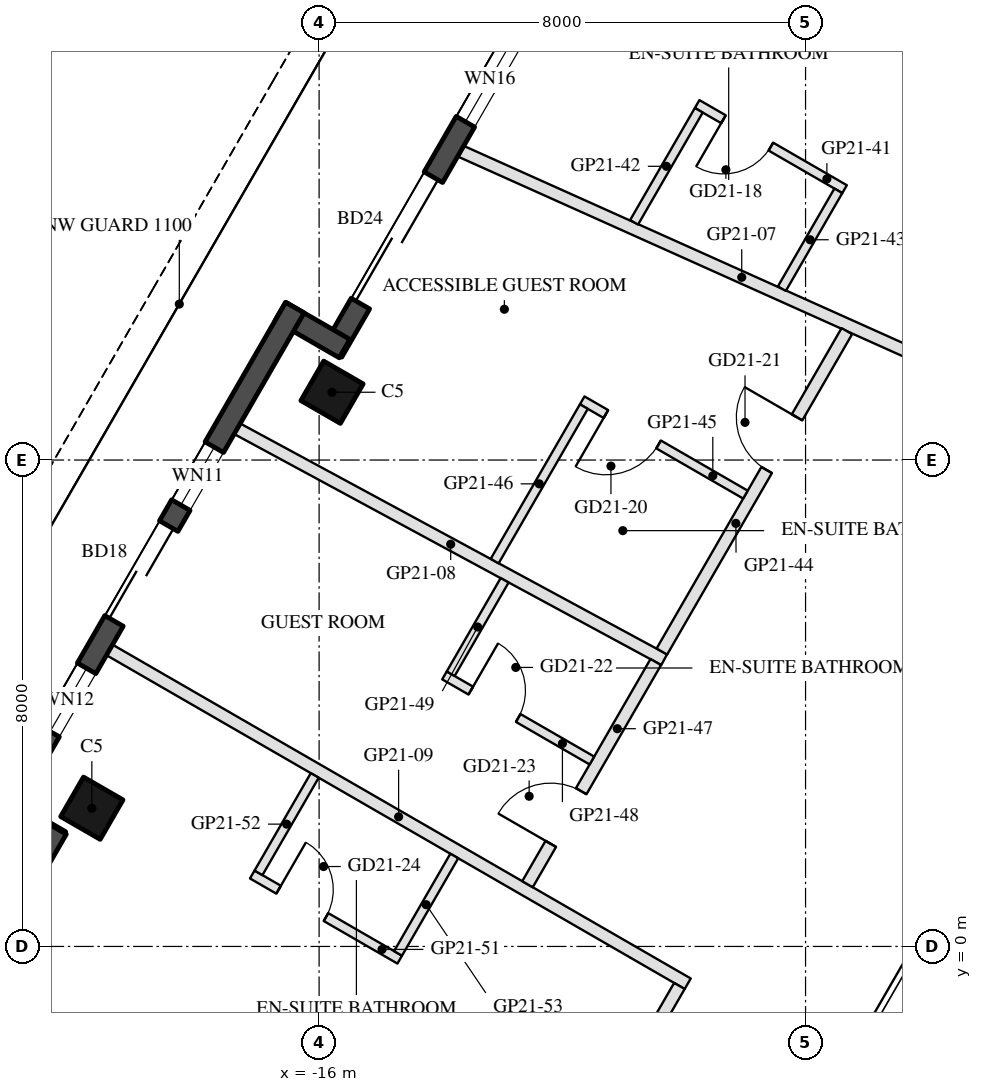
"""IFC4 building model, lengths in metres.
Left out: names, types, materials, properties, quantities, classifications, styles, units other than length and angle.
Written with IfcOpenShell. Run it as: python <this file> out.ifc"""

import sys

from ifc_helpers import new_model, si_unit, direction, frame, frame_2d, origin, origin_2d, place, context, subcontext, project, spatial, rectangle, hollow_rectangle, extrude, element, fill, save


model = new_model("IFC4")
c1 = context("Model", 3, precision=1e-05, world=origin(), true_north=direction((0.0, 1.0)))
c2 = subcontext(c1, "Body", "Model", "MODEL_VIEW")
j1 = project(units=[si_unit("LENGTHUNIT", "METRE"), si_unit("PLANEANGLEUNIT", "RADIAN")], contexts=[c1])
p1 = place(None, origin())
s1 = spatial("IfcSite", under=j1, at=p1, CompositionType="ELEMENT")
p2 = place(p1, origin())
s2 = spatial("IfcBuilding", under=s1, at=p2, CompositionType="ELEMENT")
p3 = place(p2, frame((0.0, 0.0, 220.6)))
s3 = spatial("IfcBuildingStorey", under=s2, at=p3, CompositionType="ELEMENT", Elevation=220.6)
for number, where, z_axis, x_axis in (
    (1, (-15.788, 9.115, 0.0), (0.0, 0.0, 1.0), (0.5, 0.866, 0.0)),
    (2, (-19.738, 2.273, 0.0), (0.0, 0.0, 1.0), (0.5, 0.866, 0.0)),
):
    element("IfcColumn", number, at=place(p3, frame(where, z_axis=z_axis, x_axis=x_axis)), inside=s3, PredefinedType="COLUMN", context=c2, shape_type="SweptSolid", body=[
        extrude(hollow_rectangle(XDim=0.75, YDim=0.75, WallThickness=0.035, at=origin_2d()), origin(), (0.0, 0.0, 1.0), 3.7),
    ])
p4 = place(p3, frame((-12.409, 15.617, 0.0), z_axis=(0.0, 0.0, 1.0), x_axis=(-0.500003597184, -0.866023326939, 0.0)))
e3 = element("IfcWall", 3, at=p4, inside=s3, PredefinedType="SOLIDWALL", context=c2, shape_type="SweptSolid", body=[
    extrude(rectangle(XDim=6.74, YDim=0.35, at=frame_2d((3.37, 0.0))), origin(), (0.0, 0.0, 1.0), 3.55),
])
p5 = place(p4, frame((0.77, 0.0, 0.3)))
e4 = element("IfcOpeningElement", 4, at=p5, cuts=e3, PredefinedType="OPENING", context=c2, shape_type="SweptSolid", body=[
    extrude(rectangle(XDim=1.6, YDim=2.65, at=frame_2d((0.8, 1.325))), frame((0.0, 0.185, 0.0), z_axis=(0.0, -1.0, 0.0), x_axis=(1.0, 0.0, 0.0)), (0.0, 0.0, 1.0), 0.37),
])
p6 = place(p4, frame((3.424, 0.0, 0.0)))
e5 = element("IfcOpeningElement", 5, at=p6, cuts=e3, PredefinedType="OPENING", context=c2, shape_type="SweptSolid", body=[
    extrude(rectangle(XDim=2.4, YDim=2.4, at=frame_2d((1.2, 1.2))), frame((0.0, 0.185, 0.0), z_axis=(0.0, -1.0, 0.0), x_axis=(1.0, 0.0, 0.0)), (0.0, 0.0, 1.0), 0.37),
])
p7 = place(p3, frame((-15.581, 9.833, 0.0), z_axis=(0.0, 0.0, 1.0), x_axis=(-0.866055662726, 0.499947586314, 0.0)))
e6 = element("IfcWall", 6, at=p7, inside=s3, PredefinedType="SOLIDWALL", context=c2, shape_type="SweptSolid", body=[
    extrude(rectangle(XDim=1.22, YDim=0.35, at=frame_2d((0.61, 0.0))), origin(), (0.0, 0.0, 1.0), 3.55),
])
p8 = place(p3, frame((-16.398, 10.507, 0.0), z_axis=(0.0, 0.0, 1.0), x_axis=(-0.499999142773, -0.866025898704, 0.0)))
e7 = element("IfcWall", 7, at=p8, inside=s3, PredefinedType="SOLIDWALL", context=c2, shape_type="SweptSolid", body=[
    extrude(rectangle(XDim=9.7, YDim=0.35, at=frame_2d((4.85, 0.0))), origin(), (0.0, 0.0, 1.0), 3.55),
])
p9 = place(p8, frame((4.149, 0.0, 0.0)))
e8 = element("IfcOpeningElement", 8, at=p9, cuts=e7, PredefinedType="OPENING", context=c2, shape_type="SweptSolid", body=[
    extrude(rectangle(XDim=1.8, YDim=2.4, at=frame_2d((0.9, 1.2))), frame((0.0, 0.185, 0.0), z_axis=(0.0, -1.0, 0.0), x_axis=(1.0, 0.0, 0.0)), (0.0, 0.0, 1.0), 0.37),
])
p10 = place(p8, frame((2.65, 0.0, 0.3)))
e9 = element("IfcOpeningElement", 9, at=p10, cuts=e7, PredefinedType="OPENING", context=c2, shape_type="SweptSolid", body=[
    extrude(rectangle(XDim=1.1, YDim=2.65, at=frame_2d((0.55, 1.325))), frame((0.0, 0.185, 0.0), z_axis=(0.0, -1.0, 0.0), x_axis=(1.0, 0.0, 0.0)), (0.0, 0.0, 1.0), 0.37),
])
p11 = place(p8, frame((6.85, 0.0, 0.3)))
e10 = element("IfcOpeningElement", 10, at=p11, cuts=e7, PredefinedType="OPENING", context=c2, shape_type="SweptSolid", body=[
    extrude(rectangle(XDim=1.2, YDim=2.65, at=frame_2d((0.6, 1.325))), frame((0.0, 0.185, 0.0), z_axis=(0.0, -1.0, 0.0), x_axis=(1.0, 0.0, 0.0)), (0.0, 0.0, 1.0), 0.37),
])
p12 = place(p3, frame((-21.312, 2.346, 0.0), z_axis=(0.0, 0.0, 1.0), x_axis=(0.866005645448, -0.500034220881, 0.0)))
e11 = element("IfcWall", 11, at=p12, inside=s3, PredefinedType="SOLIDWALL", context=c2, shape_type="SweptSolid", body=[
    extrude(rectangle(XDim=1.22, YDim=0.35, at=frame_2d((0.61, 0.0))), origin(), (0.0, 0.0, 1.0), 3.55),
])
p13 = place(p3, frame((-20.309, 1.934, 0.0), z_axis=(0.0, 0.0, 1.0), x_axis=(-0.499992114976, -0.866029956157, 0.0)))
e12 = element("IfcWall", 12, at=p13, inside=s3, PredefinedType="SOLIDWALL", context=c2, shape_type="SweptSolid", body=[
    extrude(rectangle(XDim=6.74, YDim=0.35, at=frame_2d((3.37, 0.0))), origin(), (0.0, 0.0, 1.0), 3.55),
])
p14 = place(p13, frame((0.77, 0.0, 0.0)))
e13 = element("IfcOpeningElement", 13, at=p14, cuts=e12, PredefinedType="OPENING", context=c2, shape_type="SweptSolid", body=[
    extrude(rectangle(XDim=2.4, YDim=2.4, at=frame_2d((1.2, 1.2))), frame((0.0, 0.185, 0.0), z_axis=(0.0, -1.0, 0.0), x_axis=(1.0, 0.0, 0.0)), (0.0, 0.0, 1.0), 0.37),
])
p15 = place(p13, frame((3.47, 0.0, 0.3)))
e14 = element("IfcOpeningElement", 14, at=p15, cuts=e12, PredefinedType="OPENING", context=c2, shape_type="SweptSolid", body=[
    extrude(rectangle(XDim=2.9, YDim=2.65, at=frame_2d((1.45, 1.325))), frame((0.0, 0.185, 0.0), z_axis=(0.0, -1.0, 0.0), x_axis=(1.0, 0.0, 0.0)), (0.0, 0.0, 1.0), 0.37),
])
p16 = place(p3, frame((-13.672, 13.08, 0.0), z_axis=(0.0, 0.0, 1.0), x_axis=(0.912311972773, -0.409495866077, 0.0)))
e15 = element("IfcWall", 15, at=p16, inside=s3, PredefinedType="PARTITIONING", context=c2, shape_type="SweptSolid", body=[
    extrude(rectangle(XDim=10.132, YDim=0.2, at=frame_2d((5.066, 0.0))), origin(), (0.0, 0.0, 1.0), 3.06),
])
p17 = place(p3, frame((-17.347, 8.514, 0.0), z_axis=(0.0, 0.0, 1.0), x_axis=(0.879604495132, -0.475705720109, 0.0)))
e16 = element("IfcWall", 16, at=p17, inside=s3, PredefinedType="PARTITIONING", context=c2, shape_type="SweptSolid", body=[
    extrude(rectangle(XDim=7.983, YDim=0.2, at=frame_2d((3.992, 0.0))), origin(), (0.0, 0.0, 1.0), 3.06),
])
p18 = place(p3, frame((-19.447, 4.877, 0.0), z_axis=(0.0, 0.0, 1.0), x_axis=(0.866027479907, -0.499996404033, 0.0)))
e17 = element("IfcWall", 17, at=p18, inside=s3, PredefinedType="PARTITIONING", context=c2, shape_type="SweptSolid", body=[
    extrude(rectangle(XDim=10.98, YDim=0.2, at=frame_2d((5.49, 0.0))), origin(), (0.0, 0.0, 1.0), 3.06),
])
p19 = place(p3, frame((-7.358, 12.455, 0.0), z_axis=(0.0, 0.0, 1.0), x_axis=(-0.866034573852, 0.49998411664, 0.0)))
e18 = element("IfcWall", 18, at=p19, inside=s3, PredefinedType="PARTITIONING", context=c2, shape_type="SweptSolid", body=[
    extrude(rectangle(XDim=2.8, YDim=0.15, at=frame_2d((1.4, 0.0))), origin(), (0.0, 0.0, 1.0), 3.55),
])
p20 = place(p19, frame((1.4, 0.0, 0.0)))
e19 = element("IfcOpeningElement", 19, at=p20, cuts=e18, PredefinedType="OPENING", context=c2, shape_type="SweptSolid", body=[
    extrude(rectangle(XDim=0.9, YDim=2.1, at=frame_2d((0.45, 1.05))), frame((0.0, 0.085, 0.0), z_axis=(0.0, -1.0, 0.0), x_axis=(1.0, 0.0, 0.0)), (0.0, 0.0, 1.0), 0.17),
])
p21 = place(p3, frame((-9.756, 13.752, 0.0), z_axis=(0.0, 0.0, 1.0), x_axis=(-0.50001378257, -0.866017446268, 0.0)))
e20 = element("IfcWall", 20, at=p21, inside=s3, PredefinedType="PARTITIONING", context=c2, shape_type="SweptSolid", body=[
    extrude(rectangle(XDim=2.128, YDim=0.15, at=frame_2d((1.064, 0.0))), origin(), (0.0, 0.0, 1.0), 3.55),
])
p22 = place(p3, frame((-7.461, 12.427, 0.0), z_axis=(0.0, 0.0, 1.0), x_axis=(-0.500025795397, -0.866010510293, 0.0)))
e21 = element("IfcWall", 21, at=p22, inside=s3, PredefinedType="PARTITIONING", context=c2, shape_type="SweptSolid", body=[
    extrude(rectangle(XDim=1.858, YDim=0.15, at=frame_2d((0.929, 0.0))), origin(), (0.0, 0.0, 1.0), 3.55),
])
p23 = place(p3, frame((-10.363, 4.851, 0.0), z_axis=(0.0, 0.0, 1.0), x_axis=(0.50000147882, 0.866024549986, 0.0)))
e22 = element("IfcWall", 22, at=p23, inside=s3, PredefinedType="PARTITIONING", context=c2, shape_type="SweptSolid", body=[
    extrude(rectangle(XDim=6.084, YDim=0.2, at=frame_2d((3.042, 0.0))), origin(), (0.0, 0.0, 1.0), 2.95),
])
p24 = place(p23, frame((3.447, 0.0, 0.0)))
e23 = element("IfcOpeningElement", 23, at=p24, cuts=e22, PredefinedType="OPENING", context=c2, shape_type="SweptSolid", body=[
    extrude(rectangle(XDim=1.0, YDim=2.1, at=frame_2d((0.5, 1.05))), frame((0.0, 0.11, 0.0), z_axis=(0.0, -1.0, 0.0), x_axis=(1.0, 0.0, 0.0)), (0.0, 0.0, 1.0), 0.22),
])
p25 = place(p3, frame((-8.989, 7.431, 0.0), z_axis=(0.0, 0.0, 1.0), x_axis=(-0.86600983753, 0.500026960575, 0.0)))
e24 = element("IfcWall", 24, at=p25, inside=s3, PredefinedType="PARTITIONING", context=c2, shape_type="SweptSolid", body=[
    extrude(rectangle(XDim=3.1, YDim=0.15, at=frame_2d((1.55, 0.0))), origin(), (0.0, 0.0, 1.0), 3.55),
])
p26 = place(p25, frame((1.65, 0.0, 0.0)))
e25 = element("IfcOpeningElement", 25, at=p26, cuts=e24, PredefinedType="OPENING", context=c2, shape_type="SweptSolid", body=[
    extrude(rectangle(XDim=1.0, YDim=2.1, at=frame_2d((0.5, 1.05))), frame((0.0, 0.085, 0.0), z_axis=(0.0, -1.0, 0.0), x_axis=(1.0, 0.0, 0.0)), (0.0, 0.0, 1.0), 0.17),
])
p27 = place(p3, frame((-11.646, 8.879, 0.0), z_axis=(0.0, 0.0, 1.0), x_axis=(-0.499996155683, -0.86602762329, 0.0)))
e26 = element("IfcWall", 26, at=p27, inside=s3, PredefinedType="PARTITIONING", context=c2, shape_type="SweptSolid", body=[
    extrude(rectangle(XDim=2.934, YDim=0.15, at=frame_2d((1.467, 0.0))), origin(), (0.0, 0.0, 1.0), 2.95),
])
p28 = place(p3, frame((-12.573, 1.023, 0.0), z_axis=(0.0, 0.0, 1.0), x_axis=(0.499991256393, 0.86603045185, 0.0)))
e27 = element("IfcWall", 27, at=p28, inside=s3, PredefinedType="PARTITIONING", context=c2, shape_type="SweptSolid", body=[
    extrude(rectangle(XDim=4.219, YDim=0.2, at=frame_2d((2.11, 0.0))), origin(), (0.0, 0.0, 1.0), 2.95),
])
p29 = place(p28, frame((0.766, 0.0, 0.0)))
e28 = element("IfcOpeningElement", 28, at=p29, cuts=e27, PredefinedType="OPENING", context=c2, shape_type="SweptSolid", body=[
    extrude(rectangle(XDim=1.0, YDim=2.1, at=frame_2d((0.5, 1.05))), frame((0.0, 0.11, 0.0), z_axis=(0.0, -1.0, 0.0), x_axis=(1.0, 0.0, 0.0)), (0.0, 0.0, 1.0), 0.22),
])
p30 = place(p3, frame((-13.938, 4.458, 0.0), z_axis=(0.0, 0.0, 1.0), x_axis=(0.865996816683, -0.500049511043, 0.0)))
e29 = element("IfcWall", 29, at=p30, inside=s3, PredefinedType="PARTITIONING", context=c2, shape_type="SweptSolid", body=[
    extrude(rectangle(XDim=2.8, YDim=0.15, at=frame_2d((1.4, 0.0))), origin(), (0.0, 0.0, 1.0), 3.55),
])
p31 = place(p30, frame((0.5, 0.0, 0.0)))
e30 = element("IfcOpeningElement", 30, at=p31, cuts=e29, PredefinedType="OPENING", context=c2, shape_type="SweptSolid", body=[
    extrude(rectangle(XDim=0.9, YDim=2.1, at=frame_2d((0.45, 1.05))), frame((0.0, 0.085, 0.0), z_axis=(0.0, -1.0, 0.0), x_axis=(1.0, 0.0, 0.0)), (0.0, 0.0, 1.0), 0.17),
])
p32 = place(p3, frame((-12.949, 6.022, 0.0), z_axis=(0.0, 0.0, 1.0), x_axis=(-0.499913039621, -0.866075604562, 0.0)))
e31 = element("IfcWall", 31, at=p32, inside=s3, PredefinedType="PARTITIONING", context=c2, shape_type="SweptSolid", body=[
    extrude(rectangle(XDim=1.774, YDim=0.15, at=frame_2d((0.887, 0.0))), origin(), (0.0, 0.0, 1.0), 3.55),
])
p33 = place(p3, frame((-12.269, -4.45, 0.0), z_axis=(0.0, 0.0, 1.0), x_axis=(0.499998569178, 0.866026229868, 0.0)))
e32 = element("IfcWall", 32, at=p33, inside=s3, PredefinedType="PARTITIONING", context=c2, shape_type="SweptSolid", body=[
    extrude(rectangle(XDim=4.388, YDim=0.2, at=frame_2d((2.194, 0.0))), origin(), (0.0, 0.0, 1.0), 2.95),
])
p34 = place(p33, frame((1.694, 0.0, 0.0)))
e33 = element("IfcOpeningElement", 33, at=p34, cuts=e32, PredefinedType="OPENING", context=c2, shape_type="SweptSolid", body=[
    extrude(rectangle(XDim=1.0, YDim=2.1, at=frame_2d((0.5, 1.05))), frame((0.0, 0.11, 0.0), z_axis=(0.0, -1.0, 0.0), x_axis=(1.0, 0.0, 0.0)), (0.0, 0.0, 1.0), 0.22),
])
p35 = place(p3, frame((-17.099, 1.183, 0.0), z_axis=(0.0, 0.0, 1.0), x_axis=(0.866056369097, -0.49994636267, 0.0)))
e34 = element("IfcWall", 34, at=p35, inside=s3, PredefinedType="PARTITIONING", context=c2, shape_type="SweptSolid", body=[
    extrude(rectangle(XDim=2.8, YDim=0.15, at=frame_2d((1.4, 0.0))), origin(), (0.0, 0.0, 1.0), 3.55),
])
p36 = place(p35, frame((0.5, 0.0, 0.0)))
e35 = element("IfcOpeningElement", 35, at=p36, cuts=e34, PredefinedType="OPENING", context=c2, shape_type="SweptSolid", body=[
    extrude(rectangle(XDim=0.9, YDim=2.1, at=frame_2d((0.45, 1.05))), frame((0.0, 0.085, 0.0), z_axis=(0.0, -1.0, 0.0), x_axis=(1.0, 0.0, 0.0)), (0.0, 0.0, 1.0), 0.17),
])
p37 = place(p3, frame((-16.072, 2.813, 0.0), z_axis=(0.0, 0.0, 1.0), x_axis=(-0.500042316284, -0.866000971088, 0.0)))
e36 = element("IfcWall", 36, at=p37, inside=s3, PredefinedType="PARTITIONING", context=c2, shape_type="SweptSolid", body=[
    extrude(rectangle(XDim=1.85, YDim=0.15, at=frame_2d((0.925, 0.0))), origin(), (0.0, 0.0, 1.0), 3.55),
])
p38 = place(p3, frame((-13.777, 1.488, 0.0), z_axis=(0.0, 0.0, 1.0), x_axis=(-0.499985172903, -0.866033964044, 0.0)))
e37 = element("IfcWall", 37, at=p38, inside=s3, PredefinedType="PARTITIONING", context=c2, shape_type="SweptSolid", body=[
    extrude(rectangle(XDim=1.85, YDim=0.15, at=frame_2d((0.925, 0.0))), origin(), (0.0, 0.0, 1.0), 3.55),
])
p39 = place(p5, origin())
e38 = element("IfcWindow", 38, at=p39, inside=s3, PartitioningType="SINGLE_PANEL", PredefinedType="WINDOW", context=c2, shape_type="SweptSolid", body=[
    extrude(rectangle(XDim=1.6, YDim=2.65, at=frame_2d((0.8, 1.325))), frame((0.0, 0.03, 0.0), z_axis=(0.0, -1.0, 0.0), x_axis=(1.0, 0.0, 0.0)), (0.0, 0.0, 1.0), 0.06),
])
fill(e4, e38)
p40 = place(p6, frame((2.4, 0.0, 0.0), z_axis=(0.0, 0.0, 1.0), x_axis=(-1.0, 0.0, 0.0)))
e39 = element("IfcDoor", 39, at=p40, inside=s3, OperationType="SLIDING_TO_LEFT", PredefinedType="DOOR", context=c2, shape_type="SweptSolid", body=[
    extrude(rectangle(XDim=2.4, YDim=2.4, at=frame_2d((1.2, 1.2))), frame((0.0, 0.025, 0.0), z_axis=(0.0, -1.0, 0.0), x_axis=(1.0, 0.0, 0.0)), (0.0, 0.0, 1.0), 0.05),
])
fill(e5, e39)
p41 = place(p9, frame((1.8, 0.0, 0.0), z_axis=(0.0, 0.0, 1.0), x_axis=(-1.0, 0.0, 0.0)))
e40 = element("IfcDoor", 40, at=p41, inside=s3, OperationType="SLIDING_TO_LEFT", PredefinedType="DOOR", context=c2, shape_type="SweptSolid", body=[
    extrude(rectangle(XDim=1.8, YDim=2.4, at=frame_2d((0.9, 1.2))), frame((0.0, 0.025, 0.0), z_axis=(0.0, -1.0, 0.0), x_axis=(1.0, 0.0, 0.0)), (0.0, 0.0, 1.0), 0.05),
])
fill(e8, e40)
p42 = place(p10, origin())
e41 = element("IfcWindow", 41, at=p42, inside=s3, PartitioningType="SINGLE_PANEL", PredefinedType="WINDOW", context=c2, shape_type="SweptSolid", body=[
    extrude(rectangle(XDim=1.1, YDim=2.65, at=frame_2d((0.55, 1.325))), frame((0.0, 0.03, 0.0), z_axis=(0.0, -1.0, 0.0), x_axis=(1.0, 0.0, 0.0)), (0.0, 0.0, 1.0), 0.06),
])
fill(e9, e41)
p43 = place(p11, origin())
e42 = element("IfcWindow", 42, at=p43, inside=s3, PartitioningType="SINGLE_PANEL", PredefinedType="WINDOW", context=c2, shape_type="SweptSolid", body=[
    extrude(rectangle(XDim=1.2, YDim=2.65, at=frame_2d((0.6, 1.325))), frame((0.0, 0.03, 0.0), z_axis=(0.0, -1.0, 0.0), x_axis=(1.0, 0.0, 0.0)), (0.0, 0.0, 1.0), 0.06),
])
fill(e10, e42)
p44 = place(p20, origin())
e43 = element("IfcDoor", 43, at=p44, inside=s3, OperationType="SINGLE_SWING_RIGHT", PredefinedType="DOOR", context=c2, shape_type="SweptSolid", body=[
    extrude(rectangle(XDim=0.9, YDim=2.1, at=frame_2d((0.45, 1.05))), frame((0.0, 0.025, 0.0), z_axis=(0.0, -1.0, 0.0), x_axis=(1.0, 0.0, 0.0)), (0.0, 0.0, 1.0), 0.05),
])
fill(e19, e43)
p45 = place(p26, origin())
e44 = element("IfcDoor", 44, at=p45, inside=s3, OperationType="SINGLE_SWING_RIGHT", PredefinedType="DOOR", context=c2, shape_type="SweptSolid", body=[
    extrude(rectangle(XDim=1.0, YDim=2.1, at=frame_2d((0.5, 1.05))), frame((0.0, 0.025, 0.0), z_axis=(0.0, -1.0, 0.0), x_axis=(1.0, 0.0, 0.0)), (0.0, 0.0, 1.0), 0.05),
])
fill(e25, e44)
p46 = place(p24, origin())
e45 = element("IfcDoor", 45, at=p46, inside=s3, OperationType="SINGLE_SWING_RIGHT", PredefinedType="DOOR", context=c2, shape_type="SweptSolid", body=[
    extrude(rectangle(XDim=1.0, YDim=2.1, at=frame_2d((0.5, 1.05))), frame((0.0, 0.025, 0.0), z_axis=(0.0, -1.0, 0.0), x_axis=(1.0, 0.0, 0.0)), (0.0, 0.0, 1.0), 0.05),
])
fill(e23, e45)
p47 = place(p31, origin())
e46 = element("IfcDoor", 46, at=p47, inside=s3, OperationType="SINGLE_SWING_LEFT", PredefinedType="DOOR", context=c2, shape_type="SweptSolid", body=[
    extrude(rectangle(XDim=0.9, YDim=2.1, at=frame_2d((0.45, 1.05))), frame((0.0, 0.025, 0.0), z_axis=(0.0, -1.0, 0.0), x_axis=(1.0, 0.0, 0.0)), (0.0, 0.0, 1.0), 0.05),
])
fill(e30, e46)
p48 = place(p29, origin())
e47 = element("IfcDoor", 47, at=p48, inside=s3, OperationType="SINGLE_SWING_LEFT", PredefinedType="DOOR", context=c2, shape_type="SweptSolid", body=[
    extrude(rectangle(XDim=1.0, YDim=2.1, at=frame_2d((0.5, 1.05))), frame((0.0, 0.025, 0.0), z_axis=(0.0, -1.0, 0.0), x_axis=(1.0, 0.0, 0.0)), (0.0, 0.0, 1.0), 0.05),
])
fill(e28, e47)
p49 = place(p36, origin())
e48 = element("IfcDoor", 48, at=p49, inside=s3, OperationType="SINGLE_SWING_LEFT", PredefinedType="DOOR", context=c2, shape_type="SweptSolid", body=[
    extrude(rectangle(XDim=0.9, YDim=2.1, at=frame_2d((0.45, 1.05))), frame((0.0, 0.025, 0.0), z_axis=(0.0, -1.0, 0.0), x_axis=(1.0, 0.0, 0.0)), (0.0, 0.0, 1.0), 0.05),
])
fill(e35, e48)
save(model, sys.argv[1])
